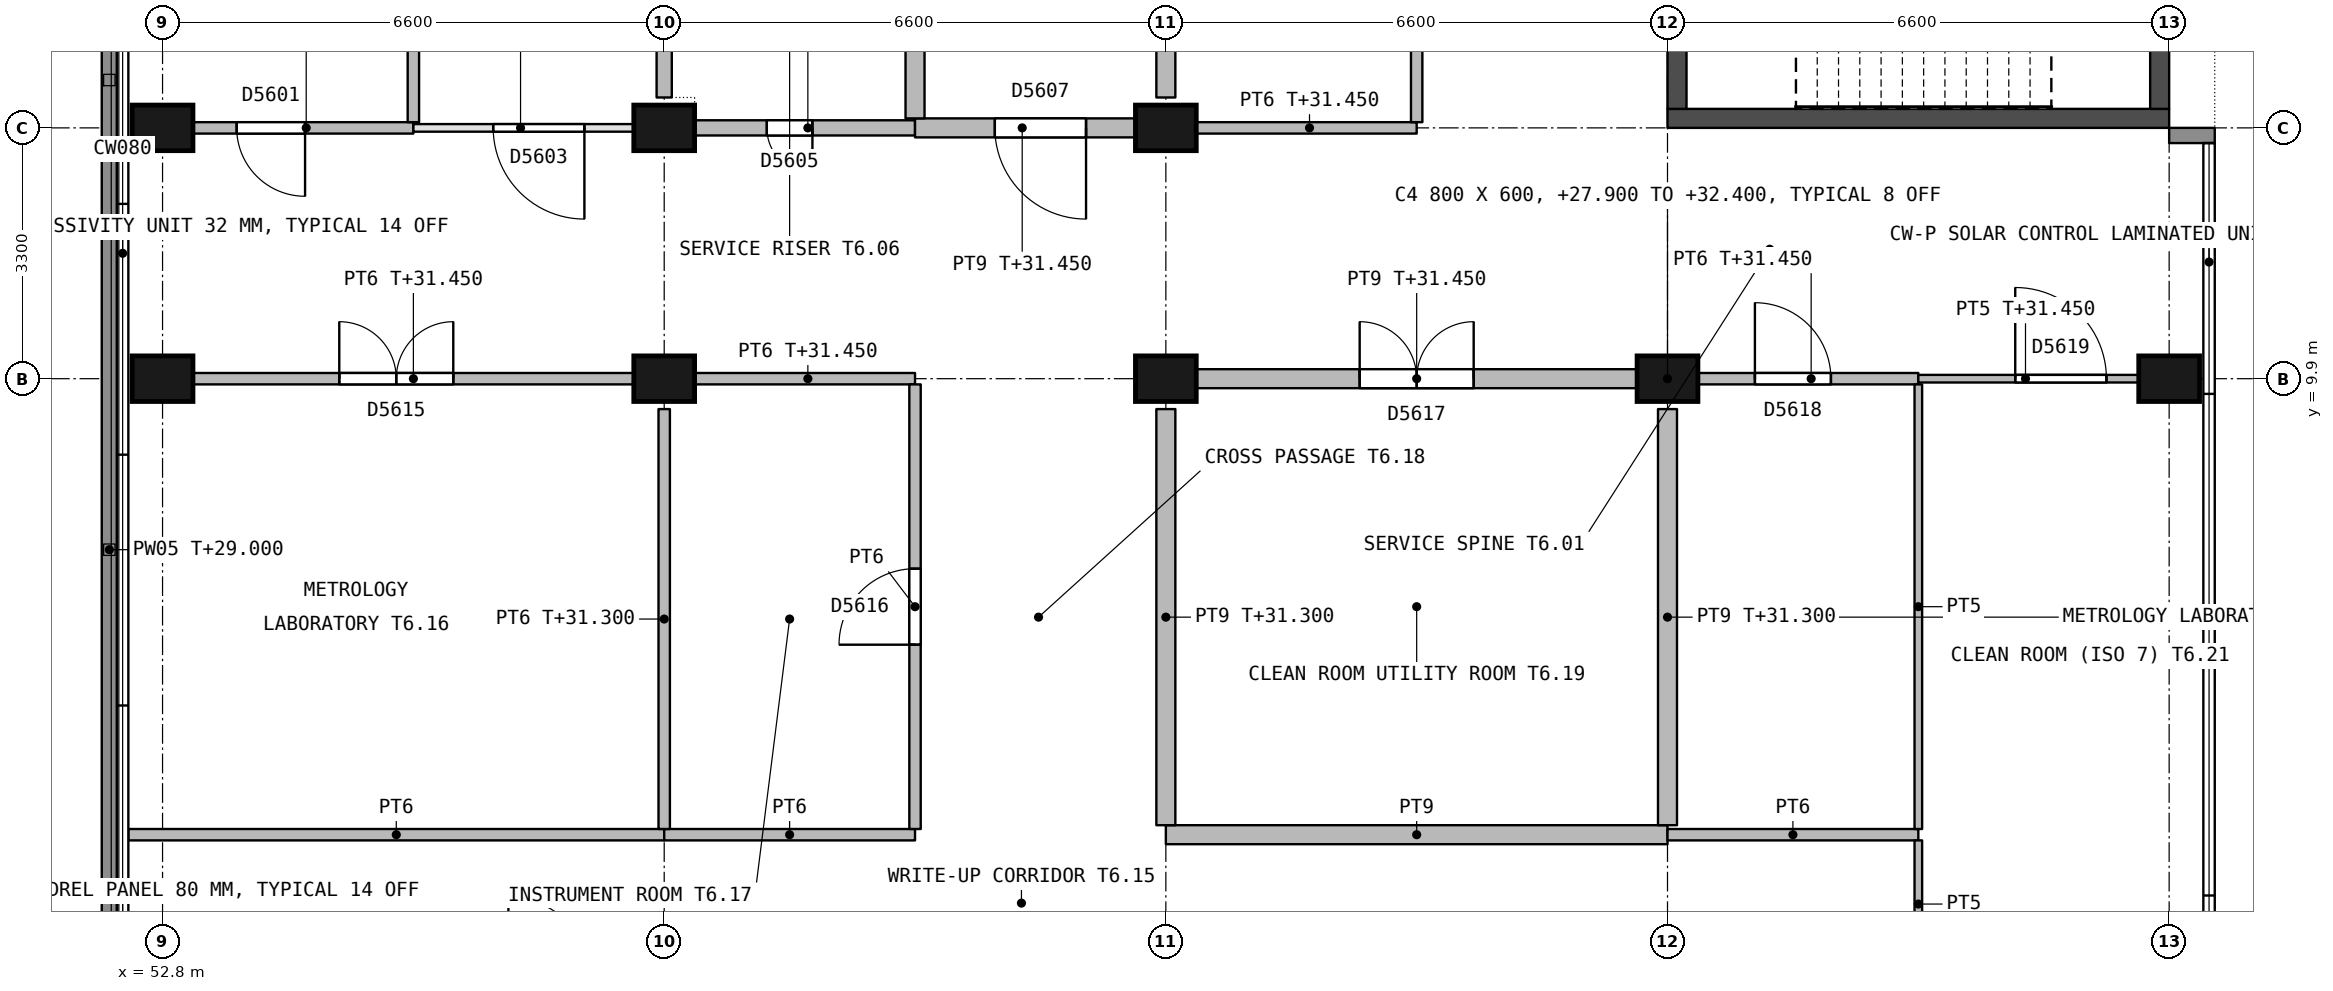
"""IFC4 building model, lengths in metres.
Left out: names, types, materials, properties, quantities, classifications, styles, units other than length and angle.
Written with IfcOpenShell. Run it as: python <this file> out.ifc"""

import sys

from ifc_helpers import new_model, si_unit, direction, frame, frame_2d, origin, origin_2d, place, context, subcontext, project, spatial, rectangle, extrude, element, fill, save


model = new_model("IFC4")
c1 = context("Model", 3, precision=1e-05, world=origin(), true_north=direction((0.0, 1.0)))
c2 = subcontext(c1, "Body", "Model", "MODEL_VIEW")
j1 = project(units=[si_unit("LENGTHUNIT", "METRE"), si_unit("PLANEANGLEUNIT", "RADIAN")], contexts=[c1])
p1 = place(None, origin())
s1 = spatial("IfcSite", under=j1, at=p1, CompositionType="ELEMENT")
p2 = place(p1, origin())
s2 = spatial("IfcBuilding", under=s1, at=p2, CompositionType="ELEMENT")
p3 = place(p2, frame((0.0, 0.0, 27.9)))
s3 = spatial("IfcBuildingStorey", under=s2, at=p3, CompositionType="ELEMENT", Elevation=27.9)
for number, where, z_axis, x_axis in (
    (1, (52.8, 9.9, 0.0), (0.0, 0.0, 1.0), (1.0, 0.0, 0.0)),
    (2, (52.8, 13.2, 0.0), (0.0, 0.0, 1.0), (1.0, 0.0, 0.0)),
    (3, (59.4, 9.9, 0.0), (0.0, 0.0, 1.0), (1.0, 0.0, 0.0)),
    (4, (59.4, 13.2, 0.0), (0.0, 0.0, 1.0), (1.0, 0.0, 0.0)),
    (5, (66.0, 9.9, 0.0), (0.0, 0.0, 1.0), (1.0, 0.0, 0.0)),
    (6, (66.0, 13.2, 0.0), (0.0, 0.0, 1.0), (1.0, 0.0, 0.0)),
    (7, (72.6, 9.9, 0.0), (0.0, 0.0, 1.0), (1.0, 0.0, 0.0)),
    (8, (79.2, 9.9, 0.0), (0.0, 0.0, 1.0), (1.0, 0.0, 0.0)),
):
    element("IfcColumn", number, at=place(p3, frame(where, z_axis=z_axis, x_axis=x_axis)), inside=s3, PredefinedType="COLUMN", context=c2, shape_type="SweptSolid", body=[
        extrude(rectangle(XDim=0.8, YDim=0.6, at=origin_2d()), origin(), (0.0, 0.0, 1.0), 4.5),
    ])
p4 = place(p3, frame((72.6, 13.325, 0.0), z_axis=(0.0, 0.0, 1.0), x_axis=(1.0, 0.0, 0.0)))
e9 = element("IfcWall", 9, at=p4, inside=s3, PredefinedType="SHEAR", context=c2, shape_type="SweptSolid", body=[
    extrude(rectangle(XDim=6.6, YDim=0.25, at=frame_2d((3.3, 0.0))), origin(), (0.0, 0.0, 1.0), 4.2),
])
p5 = place(p3, frame((72.725, 13.45, 0.0), z_axis=(0.0, 0.0, 1.0), x_axis=(0.0, 1.0, 0.0)))
e10 = element("IfcWall", 10, at=p5, inside=s3, PredefinedType="SHEAR", context=c2, shape_type="SweptSolid", body=[
    extrude(rectangle(XDim=9.4, YDim=0.25, at=frame_2d((4.7, 0.0))), origin(), (0.0, 0.0, 1.0), 4.2),
])
p6 = place(p5, frame((4.125, 0.0, 0.0)))
e11 = element("IfcOpeningElement", 11, at=p6, cuts=e10, PredefinedType="OPENING", context=c2, shape_type="SweptSolid", body=[
    extrude(rectangle(XDim=1.2, YDim=2.1, at=frame_2d((0.6, 1.05))), frame((0.0, 0.135, 0.0), z_axis=(0.0, -1.0, 0.0), x_axis=(1.0, 0.0, 0.0)), (0.0, 0.0, 1.0), 0.27),
])
p7 = place(p3, frame((79.075, 13.45, 0.0), z_axis=(0.0, 0.0, 1.0), x_axis=(0.0, 1.0, 0.0)))
e12 = element("IfcWall", 12, at=p7, inside=s3, PredefinedType="SHEAR", context=c2, shape_type="SweptSolid", body=[
    extrude(rectangle(XDim=9.4, YDim=0.25, at=frame_2d((4.7, 0.0))), origin(), (0.0, 0.0, 1.0), 4.2),
])
p8 = place(p7, frame((0.95, 0.0, 0.7)))
e13 = element("IfcOpeningElement", 13, at=p8, cuts=e12, PredefinedType="OPENING", context=c2, shape_type="SweptSolid", body=[
    extrude(rectangle(XDim=1.2, YDim=1.8, at=frame_2d((0.6, 0.9))), frame((0.0, 0.135, 0.0), z_axis=(0.0, -1.0, 0.0), x_axis=(1.0, 0.0, 0.0)), (0.0, 0.0, 1.0), 0.27),
])
p9 = place(p3, frame((79.2, 13.1, 0.0), z_axis=(0.0, 0.0, 1.0), x_axis=(1.0, 0.0, 0.0)))
e14 = element("IfcWall", 14, at=p9, inside=s3, PredefinedType="STANDARD", context=c2, shape_type="SweptSolid", body=[
    extrude(rectangle(XDim=0.6, YDim=0.2, at=frame_2d((0.3, 0.0))), origin(), (0.0, 0.0, 1.0), 3.55),
])
p10 = place(p3, frame((52.1, -7.8, 0.0), z_axis=(0.0, 0.0, 1.0), x_axis=(0.0, 1.0, 0.0)))
e15 = element("IfcWall", 15, at=p10, inside=s3, PredefinedType="PARAPET", context=c2, shape_type="SweptSolid", body=[
    extrude(rectangle(XDim=30.9, YDim=0.2, at=frame_2d((15.45, 0.0))), origin(), (0.0, 0.0, 1.0), 1.1),
])
p11 = place(p3, frame((56.1, 13.2, 0.0), z_axis=(0.0, 0.0, 1.0), x_axis=(-1.0, 0.0, 0.0)))
e16 = element("IfcWall", 16, at=p11, inside=s3, PredefinedType="PARTITIONING", context=c2, shape_type="SweptSolid", body=[
    extrude(rectangle(XDim=2.9, YDim=0.15, at=frame_2d((1.45, 0.0))), origin(), (0.0, 0.0, 1.0), 3.55),
])
p12 = place(p11, frame((1.425, 0.0, 0.0)))
e17 = element("IfcOpeningElement", 17, at=p12, cuts=e16, PredefinedType="OPENING", context=c2, shape_type="SweptSolid", body=[
    extrude(rectangle(XDim=0.9, YDim=2.1, at=frame_2d((0.45, 1.05))), frame((0.0, 0.085, 0.0), z_axis=(0.0, -1.0, 0.0), x_axis=(1.0, 0.0, 0.0)), (0.0, 0.0, 1.0), 0.17),
])
p13 = place(p3, frame((56.1, 13.2, 0.0), z_axis=(0.0, 0.0, 1.0), x_axis=(1.0, 0.0, 0.0)))
e18 = element("IfcWall", 18, at=p13, inside=s3, PredefinedType="PARTITIONING", context=c2, shape_type="SweptSolid", body=[
    extrude(rectangle(XDim=2.9, YDim=0.1, at=frame_2d((1.45, 0.0))), origin(), (0.0, 0.0, 1.0), 3.55),
])
p14 = place(p13, frame((1.05, 0.0, 0.0)))
e19 = element("IfcOpeningElement", 19, at=p14, cuts=e18, PredefinedType="OPENING", context=c2, shape_type="SweptSolid", body=[
    extrude(rectangle(XDim=1.2, YDim=2.1, at=frame_2d((0.6, 1.05))), frame((0.0, 0.06, 0.0), z_axis=(0.0, -1.0, 0.0), x_axis=(1.0, 0.0, 0.0)), (0.0, 0.0, 1.0), 0.12),
])
p15 = place(p3, frame((59.8, 13.2, 0.0), z_axis=(0.0, 0.0, 1.0), x_axis=(1.0, 0.0, 0.0)))
e20 = element("IfcWall", 20, at=p15, inside=s3, PredefinedType="PARTITIONING", context=c2, shape_type="SweptSolid", body=[
    extrude(rectangle(XDim=2.9, YDim=0.2, at=frame_2d((1.45, 0.0))), origin(), (0.0, 0.0, 1.0), 3.55),
])
p16 = place(p15, frame((0.95, 0.0, 0.0)))
e21 = element("IfcOpeningElement", 21, at=p16, cuts=e20, PredefinedType="OPENING", context=c2, shape_type="SweptSolid", body=[
    extrude(rectangle(XDim=0.6, YDim=2.1, at=frame_2d((0.3, 1.05))), frame((0.0, 0.11, 0.0), z_axis=(0.0, -1.0, 0.0), x_axis=(1.0, 0.0, 0.0)), (0.0, 0.0, 1.0), 0.22),
])
p17 = place(p3, frame((65.6, 13.2, 0.0), z_axis=(0.0, 0.0, 1.0), x_axis=(-1.0, 0.0, 0.0)))
e22 = element("IfcWall", 22, at=p17, inside=s3, PredefinedType="PARTITIONING", context=c2, shape_type="SweptSolid", body=[
    extrude(rectangle(XDim=2.9, YDim=0.25, at=frame_2d((1.45, 0.0))), origin(), (0.0, 0.0, 1.0), 3.55),
])
p18 = place(p17, frame((0.65, 0.0, 0.0)))
e23 = element("IfcOpeningElement", 23, at=p18, cuts=e22, PredefinedType="OPENING", context=c2, shape_type="SweptSolid", body=[
    extrude(rectangle(XDim=1.2, YDim=2.1, at=frame_2d((0.6, 1.05))), frame((0.0, 0.135, 0.0), z_axis=(0.0, -1.0, 0.0), x_axis=(1.0, 0.0, 0.0)), (0.0, 0.0, 1.0), 0.27),
])
p19 = place(p3, frame((69.3, 13.2, 0.0), z_axis=(0.0, 0.0, 1.0), x_axis=(-1.0, 0.0, 0.0)))
e24 = element("IfcWall", 24, at=p19, inside=s3, PredefinedType="PARTITIONING", context=c2, shape_type="SweptSolid", body=[
    extrude(rectangle(XDim=2.9, YDim=0.15, at=frame_2d((1.45, 0.0))), origin(), (0.0, 0.0, 1.0), 3.55),
])
p20 = place(p3, frame((53.2, 9.9, 0.0), z_axis=(0.0, 0.0, 1.0), x_axis=(1.0, 0.0, 0.0)))
e25 = element("IfcWall", 25, at=p20, inside=s3, PredefinedType="PARTITIONING", context=c2, shape_type="SweptSolid", body=[
    extrude(rectangle(XDim=5.8, YDim=0.15, at=frame_2d((2.9, 0.0))), origin(), (0.0, 0.0, 1.0), 3.55),
])
p21 = place(p20, frame((1.925, 0.0, 0.0)))
e26 = element("IfcOpeningElement", 26, at=p21, cuts=e25, PredefinedType="OPENING", context=c2, shape_type="SweptSolid", body=[
    extrude(rectangle(XDim=1.5, YDim=2.1, at=frame_2d((0.75, 1.05))), frame((0.0, 0.085, 0.0), z_axis=(0.0, -1.0, 0.0), x_axis=(1.0, 0.0, 0.0)), (0.0, 0.0, 1.0), 0.17),
])
p22 = place(p3, frame((59.8, 9.9, 0.0), z_axis=(0.0, 0.0, 1.0), x_axis=(1.0, 0.0, 0.0)))
e27 = element("IfcWall", 27, at=p22, inside=s3, PredefinedType="PARTITIONING", context=c2, shape_type="SweptSolid", body=[
    extrude(rectangle(XDim=2.9, YDim=0.15, at=frame_2d((1.45, 0.0))), origin(), (0.0, 0.0, 1.0), 3.55),
])
p23 = place(p3, frame((66.4, 9.9, 0.0), z_axis=(0.0, 0.0, 1.0), x_axis=(1.0, 0.0, 0.0)))
e28 = element("IfcWall", 28, at=p23, inside=s3, PredefinedType="PARTITIONING", context=c2, shape_type="SweptSolid", body=[
    extrude(rectangle(XDim=5.8, YDim=0.25, at=frame_2d((2.9, 0.0))), origin(), (0.0, 0.0, 1.0), 3.55),
])
p24 = place(p23, frame((2.15, 0.0, 0.0)))
e29 = element("IfcOpeningElement", 29, at=p24, cuts=e28, PredefinedType="OPENING", context=c2, shape_type="SweptSolid", body=[
    extrude(rectangle(XDim=1.5, YDim=2.1, at=frame_2d((0.75, 1.05))), frame((0.0, 0.135, 0.0), z_axis=(0.0, -1.0, 0.0), x_axis=(1.0, 0.0, 0.0)), (0.0, 0.0, 1.0), 0.27),
])
p25 = place(p3, frame((73.0, 9.9, 0.0), z_axis=(0.0, 0.0, 1.0), x_axis=(1.0, 0.0, 0.0)))
e30 = element("IfcWall", 30, at=p25, inside=s3, PredefinedType="PARTITIONING", context=c2, shape_type="SweptSolid", body=[
    extrude(rectangle(XDim=2.9, YDim=0.15, at=frame_2d((1.45, 0.0))), origin(), (0.0, 0.0, 1.0), 3.55),
])
p26 = place(p25, frame((0.75, 0.0, 0.0)))
e31 = element("IfcOpeningElement", 31, at=p26, cuts=e30, PredefinedType="OPENING", context=c2, shape_type="SweptSolid", body=[
    extrude(rectangle(XDim=1.0, YDim=2.1, at=frame_2d((0.5, 1.05))), frame((0.0, 0.085, 0.0), z_axis=(0.0, -1.0, 0.0), x_axis=(1.0, 0.0, 0.0)), (0.0, 0.0, 1.0), 0.17),
])
p27 = place(p3, frame((78.8, 9.9, 0.0), z_axis=(0.0, 0.0, 1.0), x_axis=(-1.0, 0.0, 0.0)))
e32 = element("IfcWall", 32, at=p27, inside=s3, PredefinedType="PARTITIONING", context=c2, shape_type="SweptSolid", body=[
    extrude(rectangle(XDim=2.9, YDim=0.1, at=frame_2d((1.45, 0.0))), origin(), (0.0, 0.0, 1.0), 3.55),
])
p28 = place(p27, frame((0.425, 0.0, 0.0)))
e33 = element("IfcOpeningElement", 33, at=p28, cuts=e32, PredefinedType="OPENING", context=c2, shape_type="SweptSolid", body=[
    extrude(rectangle(XDim=1.2, YDim=2.1, at=frame_2d((0.6, 1.05))), frame((0.0, 0.06, 0.0), z_axis=(0.0, -1.0, 0.0), x_axis=(1.0, 0.0, 0.0)), (0.0, 0.0, 1.0), 0.12),
])
p29 = place(p3, frame((56.1, 13.275, 0.0), z_axis=(0.0, 0.0, 1.0), x_axis=(0.0, 1.0, 0.0)))
e34 = element("IfcWall", 34, at=p29, inside=s3, PredefinedType="PARTITIONING", context=c2, shape_type="SweptSolid", body=[
    extrude(rectangle(XDim=3.15, YDim=0.15, at=frame_2d((1.575, 0.0))), origin(), (0.0, 0.0, 1.0), 4.2),
])
p30 = place(p3, frame((59.4, 13.6, 0.0), z_axis=(0.0, 0.0, 1.0), x_axis=(0.0, 1.0, 0.0)))
e35 = element("IfcWall", 35, at=p30, inside=s3, PredefinedType="PARTITIONING", context=c2, shape_type="SweptSolid", body=[
    extrude(rectangle(XDim=2.9, YDim=0.2, at=frame_2d((1.45, 0.0))), origin(), (0.0, 0.0, 1.0), 3.4),
])
p31 = place(p3, frame((62.7, 13.325, 0.0), z_axis=(0.0, 0.0, 1.0), x_axis=(0.0, 1.0, 0.0)))
e36 = element("IfcWall", 36, at=p31, inside=s3, PredefinedType="PARTITIONING", context=c2, shape_type="SweptSolid", body=[
    extrude(rectangle(XDim=3.075, YDim=0.25, at=frame_2d((1.538, 0.0))), origin(), (0.0, 0.0, 1.0), 4.2),
])
p32 = place(p3, frame((66.0, 13.6, 0.0), z_axis=(0.0, 0.0, 1.0), x_axis=(0.0, 1.0, 0.0)))
e37 = element("IfcWall", 37, at=p32, inside=s3, PredefinedType="PARTITIONING", context=c2, shape_type="SweptSolid", body=[
    extrude(rectangle(XDim=9.1, YDim=0.25, at=frame_2d((4.55, 0.0))), origin(), (0.0, 0.0, 1.0), 3.4),
])
p33 = place(p3, frame((69.3, 23.55, 0.0), z_axis=(0.0, 0.0, 1.0), x_axis=(0.0, -1.0, 0.0)))
e38 = element("IfcWall", 38, at=p33, inside=s3, PredefinedType="PARTITIONING", context=c2, shape_type="SweptSolid", body=[
    extrude(rectangle(XDim=10.275, YDim=0.15, at=frame_2d((5.138, 0.0))), origin(), (0.0, 0.0, 1.0), 4.2),
])
p34 = place(p33, frame((4.275, 0.0, 0.0)))
e39 = element("IfcOpeningElement", 39, at=p34, cuts=e38, PredefinedType="OPENING", context=c2, shape_type="SweptSolid", body=[
    extrude(rectangle(XDim=1.8, YDim=2.4, at=frame_2d((0.9, 1.2))), frame((0.0, 0.085, 0.0), z_axis=(0.0, -1.0, 0.0), x_axis=(1.0, 0.0, 0.0)), (0.0, 0.0, 1.0), 0.17),
])
p35 = place(p3, frame((59.4, 3.9, 0.0), z_axis=(0.0, 0.0, 1.0), x_axis=(-1.0, 0.0, 0.0)))
e40 = element("IfcWall", 40, at=p35, inside=s3, PredefinedType="PARTITIONING", context=c2, shape_type="SweptSolid", body=[
    extrude(rectangle(XDim=7.05, YDim=0.15, at=frame_2d((3.525, 0.0))), origin(), (0.0, 0.0, 1.0), 4.2),
])
p36 = place(p3, frame((62.7, 3.9, 0.0), z_axis=(0.0, 0.0, 1.0), x_axis=(-1.0, 0.0, 0.0)))
e41 = element("IfcWall", 41, at=p36, inside=s3, PredefinedType="PARTITIONING", context=c2, shape_type="SweptSolid", body=[
    extrude(rectangle(XDim=3.3, YDim=0.15, at=frame_2d((1.65, 0.0))), origin(), (0.0, 0.0, 1.0), 4.2),
])
p37 = place(p3, frame((72.6, 3.9, 0.0), z_axis=(0.0, 0.0, 1.0), x_axis=(-1.0, 0.0, 0.0)))
e42 = element("IfcWall", 42, at=p37, inside=s3, PredefinedType="PARTITIONING", context=c2, shape_type="SweptSolid", body=[
    extrude(rectangle(XDim=6.6, YDim=0.25, at=frame_2d((3.3, 0.0))), origin(), (0.0, 0.0, 1.0), 4.2),
])
p38 = place(p3, frame((75.9, 3.9, 0.0), z_axis=(0.0, 0.0, 1.0), x_axis=(-1.0, 0.0, 0.0)))
e43 = element("IfcWall", 43, at=p38, inside=s3, PredefinedType="PARTITIONING", context=c2, shape_type="SweptSolid", body=[
    extrude(rectangle(XDim=3.3, YDim=0.15, at=frame_2d((1.65, 0.0))), origin(), (0.0, 0.0, 1.0), 4.2),
])
p39 = place(p3, frame((75.9, 2.15, 0.0), z_axis=(0.0, 0.0, 1.0), x_axis=(0.0, 1.0, 0.0)))
e44 = element("IfcWall", 44, at=p39, inside=s3, PredefinedType="PARTITIONING", context=c2, shape_type="SweptSolid", body=[
    extrude(rectangle(XDim=1.675, YDim=0.1, at=frame_2d((0.837, 0.0))), origin(), (0.0, 0.0, 1.0), 4.2),
])
p40 = place(p3, frame((59.4, 3.975, 0.0), z_axis=(0.0, 0.0, 1.0), x_axis=(0.0, 1.0, 0.0)))
e45 = element("IfcWall", 45, at=p40, inside=s3, PredefinedType="PARTITIONING", context=c2, shape_type="SweptSolid", body=[
    extrude(rectangle(XDim=5.525, YDim=0.15, at=frame_2d((2.762, 0.0))), origin(), (0.0, 0.0, 1.0), 3.4),
])
p41 = place(p3, frame((62.7, 9.825, 0.0), z_axis=(0.0, 0.0, 1.0), x_axis=(0.0, -1.0, 0.0)))
e46 = element("IfcWall", 46, at=p41, inside=s3, PredefinedType="PARTITIONING", context=c2, shape_type="SweptSolid", body=[
    extrude(rectangle(XDim=5.85, YDim=0.15, at=frame_2d((2.925, 0.0))), origin(), (0.0, 0.0, 1.0), 4.2),
])
p42 = place(p41, frame((2.425, 0.0, 0.0)))
e47 = element("IfcOpeningElement", 47, at=p42, cuts=e46, PredefinedType="OPENING", context=c2, shape_type="SweptSolid", body=[
    extrude(rectangle(XDim=1.0, YDim=2.1, at=frame_2d((0.5, 1.05))), frame((0.0, 0.085, 0.0), z_axis=(0.0, -1.0, 0.0), x_axis=(1.0, 0.0, 0.0)), (0.0, 0.0, 1.0), 0.17),
])
for number, where, z_axis, x_axis in (
    (48, (66.0, 4.025, 0.0), (0.0, 0.0, 1.0), (0.0, 1.0, 0.0)),
    (49, (72.6, 4.025, 0.0), (0.0, 0.0, 1.0), (0.0, 1.0, 0.0)),
):
    element("IfcWall", number, at=place(p3, frame(where, z_axis=z_axis, x_axis=x_axis)), inside=s3, PredefinedType="PARTITIONING", context=c2, shape_type="SweptSolid", body=[
        extrude(rectangle(XDim=5.475, YDim=0.25, at=frame_2d((2.738, 0.0))), origin(), (0.0, 0.0, 1.0), 3.4),
    ])
p43 = place(p3, frame((75.9, 3.975, 0.0), z_axis=(0.0, 0.0, 1.0), x_axis=(0.0, 1.0, 0.0)))
e50 = element("IfcWall", 50, at=p43, inside=s3, PredefinedType="PARTITIONING", context=c2, shape_type="SweptSolid", body=[
    extrude(rectangle(XDim=5.85, YDim=0.1, at=frame_2d((2.925, 0.0))), origin(), (0.0, 0.0, 1.0), 4.2),
])
p44 = place(p12, origin())
e51 = element("IfcDoor", 51, at=p44, inside=s3, OperationType="SINGLE_SWING_LEFT", PredefinedType="DOOR", context=c2, shape_type="SweptSolid", body=[
    extrude(rectangle(XDim=0.9, YDim=2.1, at=frame_2d((0.45, 1.05))), frame((0.0, 0.027, 0.0), z_axis=(0.0, -1.0, 0.0), x_axis=(1.0, 0.0, 0.0)), (0.0, 0.0, 1.0), 0.054),
])
fill(e17, e51)
p45 = place(p14, origin())
e52 = element("IfcDoor", 52, at=p45, inside=s3, OperationType="SINGLE_SWING_RIGHT", PredefinedType="DOOR", context=c2, shape_type="SweptSolid", body=[
    extrude(rectangle(XDim=1.2, YDim=2.1, at=frame_2d((0.6, 1.05))), frame((0.0, 0.022, 0.0), z_axis=(0.0, -1.0, 0.0), x_axis=(1.0, 0.0, 0.0)), (0.0, 0.0, 1.0), 0.044),
])
fill(e19, e52)
p46 = place(p16, origin())
e53 = element("IfcDoor", 53, at=p46, inside=s3, OperationType="SINGLE_SWING_RIGHT", PredefinedType="DOOR", context=c2, shape_type="SweptSolid", body=[
    extrude(rectangle(XDim=0.6, YDim=2.1, at=frame_2d((0.3, 1.05))), frame((0.0, 0.03, 0.0), z_axis=(0.0, -1.0, 0.0), x_axis=(1.0, 0.0, 0.0)), (0.0, 0.0, 1.0), 0.06),
])
fill(e21, e53)
p47 = place(p18, origin())
e54 = element("IfcDoor", 54, at=p47, inside=s3, OperationType="SINGLE_SWING_LEFT", PredefinedType="DOOR", context=c2, shape_type="SweptSolid", body=[
    extrude(rectangle(XDim=1.2, YDim=2.1, at=frame_2d((0.6, 1.05))), frame((0.0, 0.03, 0.0), z_axis=(0.0, -1.0, 0.0), x_axis=(1.0, 0.0, 0.0)), (0.0, 0.0, 1.0), 0.06),
])
fill(e23, e54)
p48 = place(p21, origin())
e55 = element("IfcDoor", 55, at=p48, inside=s3, OperationType="DOUBLE_DOOR_SINGLE_SWING", PredefinedType="DOOR", context=c2, shape_type="SweptSolid", body=[
    extrude(rectangle(XDim=1.5, YDim=2.1, at=frame_2d((0.75, 1.05))), frame((0.0, 0.027, 0.0), z_axis=(0.0, -1.0, 0.0), x_axis=(1.0, 0.0, 0.0)), (0.0, 0.0, 1.0), 0.054),
])
fill(e26, e55)
p49 = place(p42, origin())
e56 = element("IfcDoor", 56, at=p49, inside=s3, OperationType="SINGLE_SWING_RIGHT", PredefinedType="DOOR", context=c2, shape_type="SweptSolid", body=[
    extrude(rectangle(XDim=1.0, YDim=2.1, at=frame_2d((0.5, 1.05))), frame((0.0, 0.027, 0.0), z_axis=(0.0, -1.0, 0.0), x_axis=(1.0, 0.0, 0.0)), (0.0, 0.0, 1.0), 0.054),
])
fill(e47, e56)
p50 = place(p24, origin())
e57 = element("IfcDoor", 57, at=p50, inside=s3, OperationType="DOUBLE_DOOR_SINGLE_SWING", PredefinedType="DOOR", context=c2, shape_type="SweptSolid", body=[
    extrude(rectangle(XDim=1.5, YDim=2.1, at=frame_2d((0.75, 1.05))), frame((0.0, 0.03, 0.0), z_axis=(0.0, -1.0, 0.0), x_axis=(1.0, 0.0, 0.0)), (0.0, 0.0, 1.0), 0.06),
])
fill(e29, e57)
p51 = place(p26, origin())
e58 = element("IfcDoor", 58, at=p51, inside=s3, OperationType="SINGLE_SWING_LEFT", PredefinedType="DOOR", context=c2, shape_type="SweptSolid", body=[
    extrude(rectangle(XDim=1.0, YDim=2.1, at=frame_2d((0.5, 1.05))), frame((0.0, 0.027, 0.0), z_axis=(0.0, -1.0, 0.0), x_axis=(1.0, 0.0, 0.0)), (0.0, 0.0, 1.0), 0.054),
])
fill(e31, e58)
p52 = place(p28, origin())
e59 = element("IfcDoor", 59, at=p52, inside=s3, OperationType="SINGLE_SWING_RIGHT", PredefinedType="DOOR", context=c2, shape_type="SweptSolid", body=[
    extrude(rectangle(XDim=1.2, YDim=2.1, at=frame_2d((0.6, 1.05))), frame((0.0, 0.03, 0.0), z_axis=(0.0, -1.0, 0.0), x_axis=(1.0, 0.0, 0.0)), (0.0, 0.0, 1.0), 0.06),
])
fill(e33, e59)
save(model, sys.argv[1])
